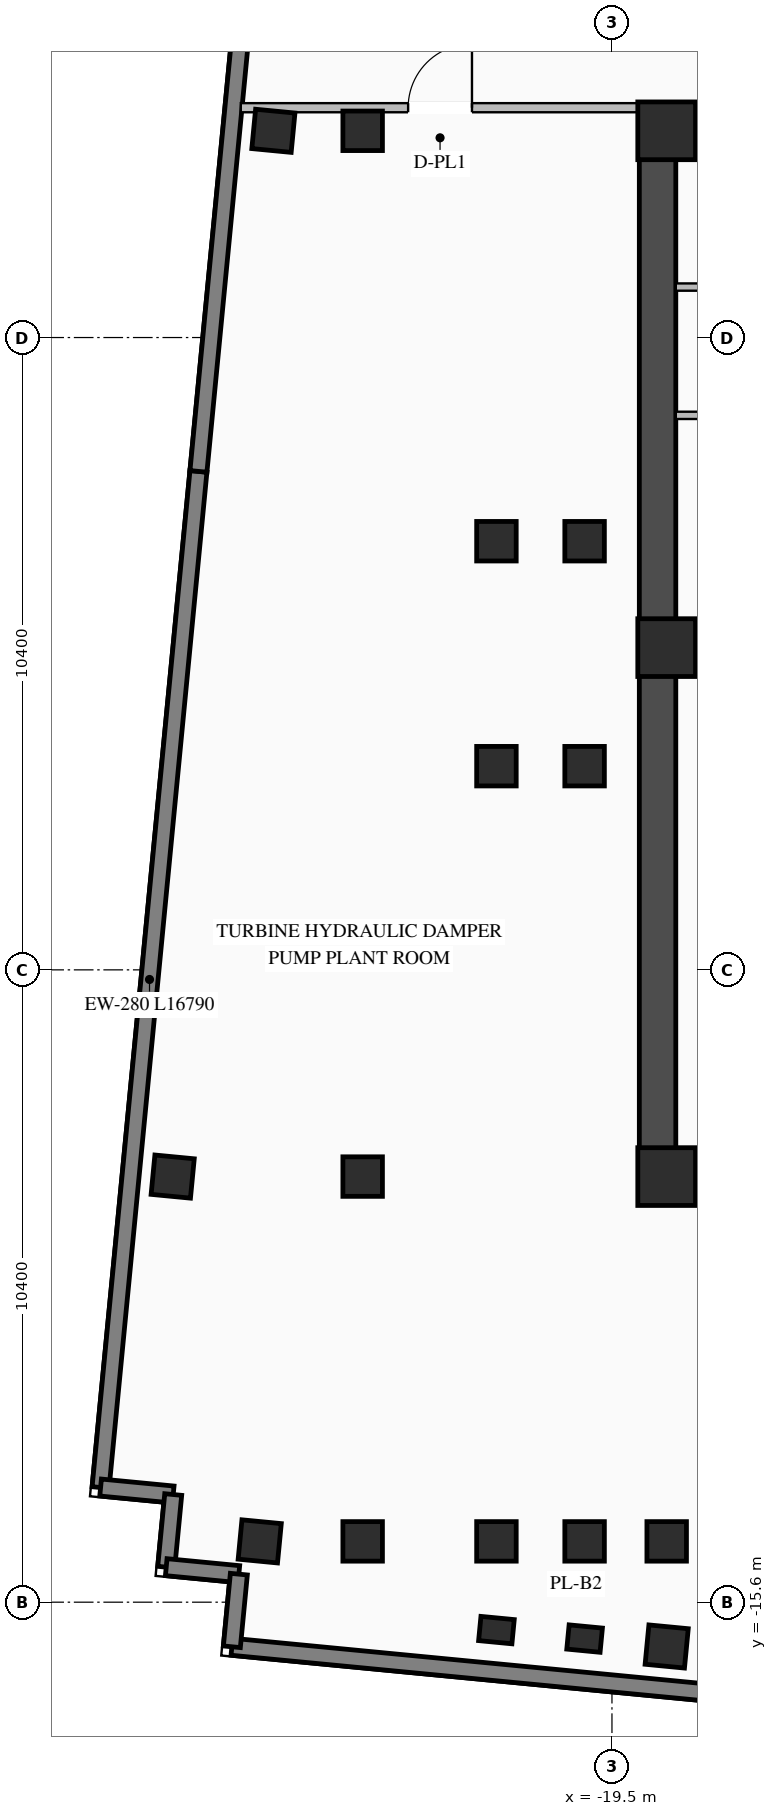
"""IFC4 building model, lengths in metres.
Left out: names, types, materials, properties, quantities, classifications, styles, units other than length and angle.
Written with IfcOpenShell. Run it as: python <this file> out.ifc"""

import sys

from ifc_helpers import new_model, si_unit, direction, frame, frame_2d, origin, origin_2d, place, context, subcontext, project, spatial, rectangle, i_section, extrude, element, fill, save


model = new_model("IFC4")
c1 = context("Model", 3, precision=1e-05, world=origin(), true_north=direction((0.0, 1.0)))
c2 = subcontext(c1, "Body", "Model", "MODEL_VIEW")
j1 = project(units=[si_unit("LENGTHUNIT", "METRE"), si_unit("PLANEANGLEUNIT", "RADIAN")], contexts=[c1])
p1 = place(None, origin())
s1 = spatial("IfcSite", under=j1, at=p1, CompositionType="ELEMENT")
p2 = place(p1, origin())
s2 = spatial("IfcBuilding", under=s1, at=p2, CompositionType="ELEMENT")
p3 = place(p2, frame((0.0, 0.0, 199.5)))
s3 = spatial("IfcBuildingStorey", under=s2, at=p3, CompositionType="ELEMENT", Elevation=199.5)
p4 = place(p3, frame((-19.05, -8.75, 0.0), z_axis=(0.0, 0.0, 1.0), x_axis=(1.0, 0.0, 0.0)))
e1 = element("IfcWall", 1, at=p4, inside=s3, PredefinedType="SHEAR", context=c2, shape_type="SweptSolid", body=[
    extrude(rectangle(XDim=10.25, YDim=0.6, at=frame_2d((5.125, 0.0))), origin(), (0.0, 0.0, 1.0), 4.52),
])
p5 = place(p3, frame((-19.05, 8.75, 0.0), z_axis=(0.0, 0.0, 1.0), x_axis=(1.0, 0.0, 0.0)))
e2 = element("IfcWall", 2, at=p5, inside=s3, PredefinedType="SHEAR", context=c2, shape_type="SweptSolid", body=[
    extrude(rectangle(XDim=10.25, YDim=0.6, at=frame_2d((5.125, 0.0))), origin(), (0.0, 0.0, 1.0), 4.52),
])
p6 = place(p5, frame((5.6, 0.0, 0.0)))
e3 = element("IfcOpeningElement", 3, at=p6, cuts=e2, PredefinedType="OPENING", context=c2, shape_type="SweptSolid", body=[
    extrude(rectangle(XDim=1.4, YDim=2.05, at=frame_2d((0.7, 1.025))), frame((0.0, 0.31, 0.0), z_axis=(0.0, -1.0, 0.0), x_axis=(1.0, 0.0, 0.0)), (0.0, 0.0, 1.0), 0.62),
])
p7 = place(p3, frame((-18.75, -8.45, 0.0), z_axis=(0.0, 0.0, 1.0), x_axis=(0.0, 1.0, 0.0)))
e4 = element("IfcWall", 4, at=p7, inside=s3, PredefinedType="SHEAR", context=c2, shape_type="SweptSolid", body=[
    extrude(rectangle(XDim=16.9, YDim=0.6, at=frame_2d((8.45, 0.0))), origin(), (0.0, 0.0, 1.0), 4.52),
])
for number, where, z_axis, x_axis in (
    (5, (-18.6, -8.6, 0.0), (0.0, 0.0, 1.0), (1.0, 0.0, 0.0)),
    (6, (-18.6, 0.1, 0.0), (0.0, 0.0, 1.0), (1.0, 0.0, 0.0)),
    (7, (-18.6, 8.6, 0.0), (0.0, 0.0, 1.0), (1.0, 0.0, 0.0)),
):
    element("IfcColumn", number, at=place(p3, frame(where, z_axis=z_axis, x_axis=x_axis)), inside=s3, PredefinedType="COLUMN", context=c2, shape_type="SweptSolid", body=[
        extrude(rectangle(XDim=0.95, YDim=0.95, at=origin_2d()), origin(), (0.0, 0.0, 1.0), 4.8),
    ])
for number, where, z_axis, x_axis in (
    (8, (-21.4, -14.6, 0.0), (0.0, 0.0, 1.0), (1.0, 0.0, 0.0)),
    (9, (-19.95, -14.6, 0.0), (0.0, 0.0, 1.0), (1.0, 0.0, 0.0)),
    (10, (-18.6, -14.6, 0.0), (0.0, 0.0, 1.0), (1.0, 0.0, 0.0)),
    (11, (-21.4, -1.85, 0.0), (0.0, 0.0, 1.0), (1.0, 0.0, 0.0)),
    (12, (-21.4, 1.85, 0.0), (0.0, 0.0, 1.0), (1.0, 0.0, 0.0)),
    (13, (-19.95, -1.85, 0.0), (0.0, 0.0, 1.0), (1.0, 0.0, 0.0)),
    (14, (-19.95, 1.85, 0.0), (0.0, 0.0, 1.0), (1.0, 0.0, 0.0)),
    (15, (-23.6, -14.6, 0.0), (0.0, 0.0, 1.0), (1.0, 0.0, 0.0)),
    (16, (-23.6, -8.6, 0.0), (0.0, 0.0, 1.0), (1.0, 0.0, 0.0)),
    (17, (-23.6, 8.6, 0.0), (0.0, 0.0, 1.0), (1.0, 0.0, 0.0)),
    (18, (-18.6, -16.329, 0.0), (0.0, 0.0, 1.0), (0.995, -0.096, 0.0)),
    (19, (-25.293, -14.6, 0.0), (0.0, 0.0, 1.0), (0.995, -0.096, 0.0)),
    (20, (-26.724, -8.6, 0.0), (0.0, 0.0, 1.0), (0.995, -0.096, 0.0)),
    (21, (-25.068, 8.6, 0.0), (0.0, 0.0, 1.0), (0.995, -0.096, 0.0)),
):
    element("IfcColumn", number, at=place(p3, frame(where, z_axis=z_axis, x_axis=x_axis)), inside=s3, PredefinedType="COLUMN", context=c2, shape_type="SweptSolid", body=[
        extrude(i_section(OverallWidth=0.65, OverallDepth=0.65, WebThickness=0.028, FlangeThickness=0.04, at=origin_2d()), origin(), (0.0, 0.0, 1.0), 4.8),
    ])
for number, where, z_axis, x_axis in (
    (22, (-21.4, -16.059, 0.0), (0.0, 0.0, 1.0), (0.995, -0.096, 0.0)),
    (23, (-19.95, -16.199, 0.0), (0.0, 0.0, 1.0), (0.995, -0.096, 0.0)),
):
    element("IfcColumn", number, at=place(p3, frame(where, z_axis=z_axis, x_axis=x_axis)), inside=s3, PredefinedType="PILASTER", context=c2, shape_type="SweptSolid", body=[
        extrude(rectangle(XDim=0.55, YDim=0.4, at=origin_2d()), origin(), (0.0, 0.0, 1.0), 4.8),
    ])
p8 = place(p3, frame((-11.477, -17.708, 0.0), z_axis=(0.0, 0.0, 1.0), x_axis=(-0.995395762701, 0.095850276977, 0.0)))
e24 = element("IfcWall", 24, at=p8, inside=s3, PredefinedType="STANDARD", context=c2, shape_type="SweptSolid", body=[
    extrude(rectangle(XDim=14.34, YDim=0.28, at=frame_2d((7.17, 0.0))), origin(), (0.0, 0.0, 1.0), 2.695),
])
p9 = place(p3, frame((-27.91, -13.714, 0.0), z_axis=(0.0, 0.0, 1.0), x_axis=(0.095839027265, 0.995396845913, 0.0)))
e25 = element("IfcWall", 25, at=p9, inside=s3, PredefinedType="STANDARD", context=c2, shape_type="SweptSolid", body=[
    extrude(rectangle(XDim=16.79, YDim=0.28, at=frame_2d((8.395, 0.0))), origin(), (0.0, 0.0, 1.0), 4.5),
])
p10 = place(p3, frame((-26.301, 2.998, 0.0), z_axis=(0.0, 0.0, 1.0), x_axis=(0.095837640115, 0.99539697947, 0.0)))
e26 = element("IfcWall", 26, at=p10, inside=s3, PredefinedType="STANDARD", context=c2, shape_type="SweptSolid", body=[
    extrude(rectangle(XDim=16.79, YDim=0.28, at=frame_2d((8.395, 0.0))), origin(), (0.0, 0.0, 1.0), 4.5),
])
p11 = place(p3, frame((-27.91, -13.714, 0.0), z_axis=(0.0, 0.0, 1.0), x_axis=(0.995397091755, -0.095836473879, 0.0)))
e27 = element("IfcWall", 27, at=p11, inside=s3, PredefinedType="STANDARD", context=c2, shape_type="SweptSolid", body=[
    extrude(rectangle(XDim=1.2, YDim=0.28, at=frame_2d((0.6, 0.0))), origin(), (0.0, 0.0, 1.0), 2.695),
])
for number, where, z_axis, x_axis in (
    (28, (-26.716, -13.829, 0.0), (0.0, 0.0, 1.0), (-0.096, -0.995, 0.0)),
    (29, (-26.831, -15.024, 0.0), (0.0, 0.0, 1.0), (0.995, -0.096, 0.0)),
):
    element("IfcWall", number, at=place(p3, frame(where, z_axis=z_axis, x_axis=x_axis)), inside=s3, PredefinedType="STANDARD", context=c2, shape_type="SweptSolid", body=[
        extrude(rectangle(XDim=1.2, YDim=0.28, at=frame_2d((0.6, 0.0))), origin(), (0.0, 0.0, 1.0), 2.695),
    ])
p12 = place(p3, frame((-25.636, -15.139, 0.0), z_axis=(0.0, 0.0, 1.0), x_axis=(-0.096038073607, -0.995377661201, 0.0)))
e30 = element("IfcWall", 30, at=p12, inside=s3, PredefinedType="STANDARD", context=c2, shape_type="SweptSolid", body=[
    extrude(rectangle(XDim=1.2, YDim=0.28, at=frame_2d((0.6, 0.0))), origin(), (0.0, 0.0, 1.0), 2.695),
])
p13 = place(p3, frame((-18.45, 3.92, 0.0), z_axis=(0.0, 0.0, 1.0), x_axis=(1.0, 0.0, 0.0)))
e31 = element("IfcWall", 31, at=p13, inside=s3, PredefinedType="STANDARD", context=c2, shape_type="SweptSolid", body=[
    extrude(rectangle(XDim=4.55, YDim=0.12, at=frame_2d((2.275, 0.0))), origin(), (0.0, 0.0, 1.0), 4.5),
])
p14 = place(p3, frame((-18.45, 6.03, 0.0), z_axis=(0.0, 0.0, 1.0), x_axis=(1.0, 0.0, 0.0)))
e32 = element("IfcWall", 32, at=p14, inside=s3, PredefinedType="STANDARD", context=c2, shape_type="SweptSolid", body=[
    extrude(rectangle(XDim=2.3, YDim=0.12, at=frame_2d((1.15, 0.0))), origin(), (0.0, 0.0, 1.0), 4.5),
])
p15 = place(p3, frame((-25.604, 8.98, 0.0), z_axis=(0.0, 0.0, 1.0), x_axis=(1.0, 0.0, 0.0)))
e33 = element("IfcWall", 33, at=p15, inside=s3, PredefinedType="STANDARD", context=c2, shape_type="SweptSolid", body=[
    extrude(rectangle(XDim=6.554, YDim=0.15, at=frame_2d((3.277, 0.0))), origin(), (0.0, 0.0, 1.0), 4.5),
])
p16 = place(p15, frame((2.752, 0.0, 0.0)))
e34 = element("IfcOpeningElement", 34, at=p16, cuts=e33, PredefinedType="OPENING", context=c2, shape_type="SweptSolid", body=[
    extrude(rectangle(XDim=1.05, YDim=2.08, at=frame_2d((0.525, 1.04))), frame((0.0, 0.085, 0.0), z_axis=(0.0, -1.0, 0.0), x_axis=(1.0, 0.0, 0.0)), (0.0, 0.0, 1.0), 0.17),
])
p17 = place(p16, origin())
e35 = element("IfcDoor", 35, at=p17, inside=s3, OperationType="SINGLE_SWING_RIGHT", PredefinedType="DOOR", context=c2, shape_type="SweptSolid", body=[
    extrude(rectangle(XDim=1.05, YDim=2.08, at=frame_2d((0.525, 1.04))), frame((0.0, 0.025, 0.0), z_axis=(0.0, -1.0, 0.0), x_axis=(1.0, 0.0, 0.0)), (0.0, 0.0, 1.0), 0.05),
])
fill(e34, e35)
save(model, sys.argv[1])
